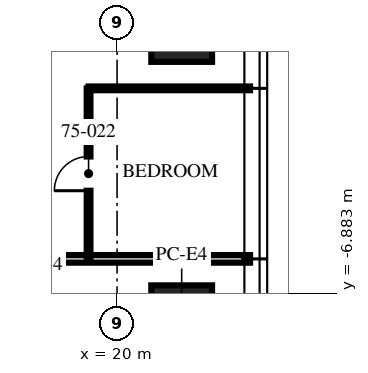
"""IFC4 building model, lengths in metres.
Left out: names, types, materials, properties, quantities, classifications, styles, units other than length and angle.
Written with IfcOpenShell. Run it as: python <this file> out.ifc"""

import sys

from ifc_helpers import new_model, si_unit, direction, frame, frame_2d, origin, origin_2d, place, context, subcontext, project, spatial, rectangle, extrude, element, fill, save


model = new_model("IFC4")
c1 = context("Model", 3, precision=1e-05, world=origin(), true_north=direction((0.0, 1.0)))
c2 = subcontext(c1, "Body", "Model", "MODEL_VIEW")
j1 = project(units=[si_unit("LENGTHUNIT", "METRE"), si_unit("PLANEANGLEUNIT", "RADIAN")], contexts=[c1])
p1 = place(None, origin())
s1 = spatial("IfcSite", under=j1, at=p1, CompositionType="ELEMENT")
p2 = place(p1, origin())
s2 = spatial("IfcBuilding", under=s1, at=p2, CompositionType="ELEMENT")
p3 = place(p2, frame((0.0, 0.0, 300.75)))
s3 = spatial("IfcBuildingStorey", under=s2, at=p3, CompositionType="ELEMENT", Elevation=300.75)
for number, where, z_axis, x_axis in (
    (1, (21.7, 0.0, 0.0), (0.0, 0.0, 1.0), (0.0, 1.0, 0.0)),
    (2, (21.7, -7.48, 0.0), (0.0, 0.0, 1.0), (0.0, 1.0, 0.0)),
):
    element("IfcColumn", number, at=place(p3, frame(where, z_axis=z_axis, x_axis=x_axis)), inside=s3, PredefinedType="COLUMN", context=c2, shape_type="SweptSolid", body=[
        extrude(rectangle(XDim=1.6, YDim=1.6, at=origin_2d()), origin(), (0.0, 0.0, 1.0), 3.75),
    ])
p4 = place(p3, frame((17.95, -5.984, 0.0), z_axis=(0.0, 0.0, 1.0), x_axis=(1.0, 0.0, 0.0)))
e3 = element("IfcWall", 3, at=p4, inside=s3, PredefinedType="PARTITIONING", context=c2, shape_type="SweptSolid", body=[
    extrude(rectangle(XDim=5.55, YDim=0.2, at=frame_2d((2.775, 0.0))), origin(), (0.0, 0.0, 1.0), 3.01),
])
p5 = place(p3, frame((19.25, -1.496, 0.0), z_axis=(0.0, 0.0, 1.0), x_axis=(1.0, 0.0, 0.0)))
e4 = element("IfcWall", 4, at=p5, inside=s3, PredefinedType="PARTITIONING", context=c2, shape_type="SweptSolid", body=[
    extrude(rectangle(XDim=4.25, YDim=0.1, at=frame_2d((2.125, 0.0))), origin(), (0.0, 0.0, 1.0), 3.01),
])
p6 = place(p3, frame((19.25, -5.984, 0.0), z_axis=(0.0, 0.0, 1.0), x_axis=(0.0, 1.0, 0.0)))
e5 = element("IfcWall", 5, at=p6, inside=s3, PredefinedType="PARTITIONING", context=c2, shape_type="SweptSolid", body=[
    extrude(rectangle(XDim=4.488, YDim=0.1, at=frame_2d((2.244, 0.0))), origin(), (0.0, 0.0, 1.0), 2.91),
])
p7 = place(p6, frame((1.794, 0.0, 0.0)))
e6 = element("IfcOpeningElement", 6, at=p7, cuts=e5, PredefinedType="OPENING", context=c2, shape_type="SweptSolid", body=[
    extrude(rectangle(XDim=0.9, YDim=2.1, at=frame_2d((0.45, 1.05))), frame((0.0, 0.06, 0.0), z_axis=(0.0, -1.0, 0.0), x_axis=(1.0, 0.0, 0.0)), (0.0, 0.0, 1.0), 0.12),
])
p8 = place(p7, origin())
e7 = element("IfcDoor", 7, at=p8, inside=s3, OperationType="SINGLE_SWING_LEFT", PredefinedType="DOOR", context=c2, shape_type="SweptSolid", body=[
    extrude(rectangle(XDim=0.9, YDim=2.1, at=frame_2d((0.45, 1.05))), frame((0.0, 0.025, 0.0), z_axis=(0.0, -1.0, 0.0), x_axis=(1.0, 0.0, 0.0)), (0.0, 0.0, 1.0), 0.05),
])
fill(e6, e7)
save(model, sys.argv[1])
